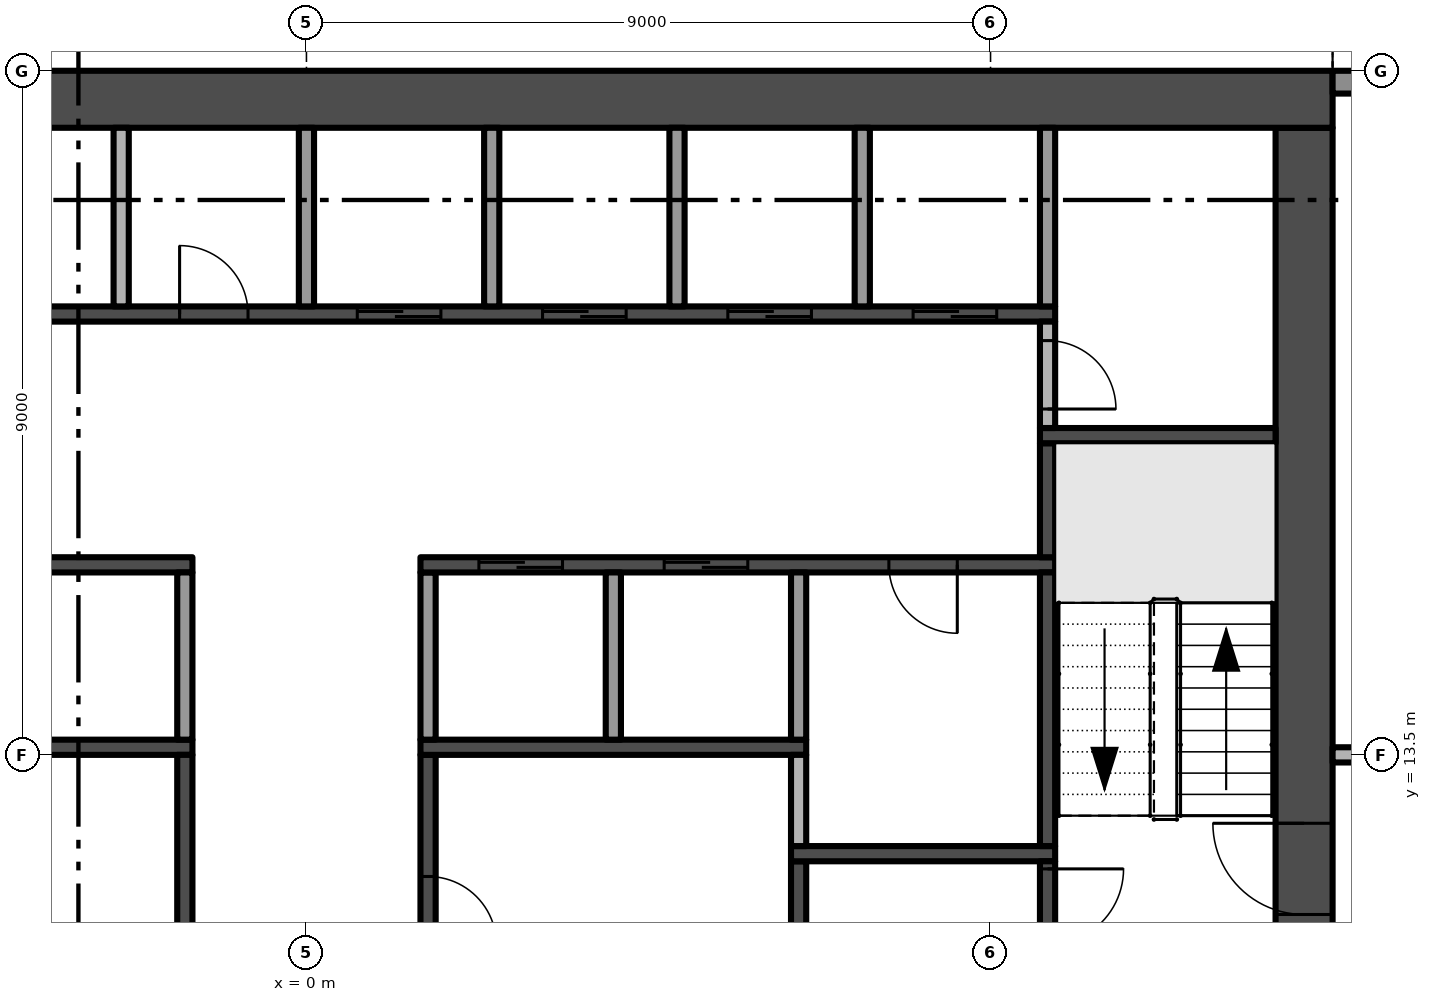
"""IFC4 building model, lengths in metres.
Left out: names, types, materials, properties, quantities, classifications, styles, units other than length and angle.
Written with IfcOpenShell. Run it as: python <this file> out.ifc"""

import sys

from ifc_helpers import new_model, si_unit, direction, frame, frame_2d, origin, place, context, subcontext, project, spatial, rectangle, extrude, element, fill, save


model = new_model("IFC4")
c1 = context("Model", 3, precision=1e-05, world=origin(), true_north=direction((0.0, 1.0)))
c2 = subcontext(c1, "Body", "Model", "MODEL_VIEW")
j1 = project(units=[si_unit("LENGTHUNIT", "METRE"), si_unit("PLANEANGLEUNIT", "RADIAN")], contexts=[c1])
p1 = place(None, origin())
s1 = spatial("IfcSite", under=j1, at=p1, CompositionType="ELEMENT")
p2 = place(p1, origin())
s2 = spatial("IfcBuilding", under=s1, at=p2, CompositionType="ELEMENT")
p3 = place(p2, frame((0.0, 0.0, 132.6)))
s3 = spatial("IfcBuildingStorey", under=s2, at=p3, CompositionType="ELEMENT", Elevation=132.6)
p4 = place(p3, frame((13.125, 5.25, -0.3), z_axis=(0.0, 0.0, 1.0), x_axis=(0.0, 1.0, 0.0)))
e1 = element("IfcWall", 1, at=p4, inside=s3, PredefinedType="SHEAR", context=c2, shape_type="SweptSolid", body=[
    extrude(rectangle(XDim=16.5, YDim=0.75, at=frame_2d((8.25, 0.0))), origin(), (0.0, 0.0, 1.0), 3.8),
])
p5 = place(p4, frame((6.15, 0.0, 0.3)))
e2 = element("IfcOpeningElement", 2, at=p5, cuts=e1, PredefinedType="OPENING", context=c2, shape_type="SweptSolid", body=[
    extrude(rectangle(XDim=1.2, YDim=2.2, at=frame_2d((0.6, 1.1))), frame((0.0, 0.385, 0.0), z_axis=(0.0, -1.0, 0.0), x_axis=(1.0, 0.0, 0.0)), (0.0, 0.0, 1.0), 0.77),
])
p6 = place(p3, frame((13.5, 22.125, -0.3), z_axis=(0.0, 0.0, 1.0), x_axis=(-1.0, 0.0, 0.0)))
e3 = element("IfcWall", 3, at=p6, inside=s3, PredefinedType="SHEAR", context=c2, shape_type="SweptSolid", body=[
    extrude(rectangle(XDim=27.0, YDim=0.75, at=frame_2d((13.5, 0.0))), origin(), (0.0, 0.0, 1.0), 3.8),
])
p7 = place(p3, frame((13.5, 22.35, 0.0), z_axis=(0.0, 0.0, 1.0), x_axis=(1.0, 0.0, 0.0)))
e4 = element("IfcWall", 4, at=p7, inside=s3, PredefinedType="SOLIDWALL", context=c2, shape_type="SweptSolid", body=[
    extrude(rectangle(XDim=3.3, YDim=0.3, at=frame_2d((1.65, 0.0))), origin(), (0.0, 0.0, 1.0), 3.5),
])
p8 = place(p7, frame((2.05, 0.0, 0.45)))
e5 = element("IfcOpeningElement", 5, at=p8, cuts=e4, PredefinedType="OPENING", context=c2, shape_type="SweptSolid", body=[
    extrude(rectangle(XDim=0.95, YDim=2.65, at=frame_2d((0.475, 1.325))), frame((0.0, 0.16, 0.0), z_axis=(0.0, -1.0, 0.0), x_axis=(1.0, 0.0, 0.0)), (0.0, 0.0, 1.0), 0.32),
])
p9 = place(p7, frame((0.7, 0.0, 0.0)))
e6 = element("IfcOpeningElement", 6, at=p9, cuts=e4, PredefinedType="OPENING", context=c2, shape_type="SweptSolid", body=[
    extrude(rectangle(XDim=1.2, YDim=2.4, at=frame_2d((0.6, 1.2))), frame((0.0, 0.16, 0.0), z_axis=(0.0, -1.0, 0.0), x_axis=(1.0, 0.0, 0.0)), (0.0, 0.0, 1.0), 0.32),
])
p10 = place(p3, frame((-1.5, 16.0, 0.0), z_axis=(0.0, 0.0, 1.0), x_axis=(-1.0, 0.0, 0.0)))
e7 = element("IfcWall", 7, at=p10, inside=s3, PredefinedType="SHEAR", context=c2, shape_type="SweptSolid", body=[
    extrude(rectangle(XDim=8.35, YDim=0.2, at=frame_2d((4.175, 0.0))), origin(), (0.0, 0.0, 1.0), 3.5),
])
p11 = place(p10, frame((6.162, 0.0, 0.0)))
e8 = element("IfcOpeningElement", 8, at=p11, cuts=e7, PredefinedType="OPENING", context=c2, shape_type="SweptSolid", body=[
    extrude(rectangle(XDim=0.9, YDim=2.1, at=frame_2d((0.45, 1.05))), frame((0.0, 0.11, 0.0), z_axis=(0.0, -1.0, 0.0), x_axis=(1.0, 0.0, 0.0)), (0.0, 0.0, 1.0), 0.22),
])
p12 = place(p3, frame((-9.85, 19.3, 0.0), z_axis=(0.0, 0.0, 1.0), x_axis=(1.0, 0.0, 0.0)))
e9 = element("IfcWall", 9, at=p12, inside=s3, PredefinedType="SHEAR", context=c2, shape_type="SweptSolid", body=[
    extrude(rectangle(XDim=19.7, YDim=0.2, at=frame_2d((9.85, 0.0))), origin(), (0.0, 0.0, 1.0), 3.5),
])
p13 = place(p12, frame((10.519, 0.0, 0.0)))
e10 = element("IfcOpeningElement", 10, at=p13, cuts=e9, PredefinedType="OPENING", context=c2, shape_type="SweptSolid", body=[
    extrude(rectangle(XDim=1.1, YDim=2.1, at=frame_2d((0.55, 1.05))), frame((0.0, 0.11, 0.0), z_axis=(0.0, -1.0, 0.0), x_axis=(1.0, 0.0, 0.0)), (0.0, 0.0, 1.0), 0.22),
])
p14 = place(p12, frame((12.956, 0.0, 0.0)))
e11 = element("IfcOpeningElement", 11, at=p14, cuts=e9, PredefinedType="OPENING", context=c2, shape_type="SweptSolid", body=[
    extrude(rectangle(XDim=1.1, YDim=2.1, at=frame_2d((0.55, 1.05))), frame((0.0, 0.11, 0.0), z_axis=(0.0, -1.0, 0.0), x_axis=(1.0, 0.0, 0.0)), (0.0, 0.0, 1.0), 0.22),
])
p15 = place(p12, frame((15.394, 0.0, 0.0)))
e12 = element("IfcOpeningElement", 12, at=p15, cuts=e9, PredefinedType="OPENING", context=c2, shape_type="SweptSolid", body=[
    extrude(rectangle(XDim=1.1, YDim=2.1, at=frame_2d((0.55, 1.05))), frame((0.0, 0.11, 0.0), z_axis=(0.0, -1.0, 0.0), x_axis=(1.0, 0.0, 0.0)), (0.0, 0.0, 1.0), 0.22),
])
p16 = place(p12, frame((17.831, 0.0, 0.0)))
e13 = element("IfcOpeningElement", 13, at=p16, cuts=e9, PredefinedType="OPENING", context=c2, shape_type="SweptSolid", body=[
    extrude(rectangle(XDim=1.1, YDim=2.1, at=frame_2d((0.55, 1.05))), frame((0.0, 0.11, 0.0), z_axis=(0.0, -1.0, 0.0), x_axis=(1.0, 0.0, 0.0)), (0.0, 0.0, 1.0), 0.22),
])
p17 = place(p12, frame((3.306, 0.0, 0.0)))
e14 = element("IfcOpeningElement", 14, at=p17, cuts=e9, PredefinedType="OPENING", context=c2, shape_type="SweptSolid", body=[
    extrude(rectangle(XDim=0.9, YDim=2.1, at=frame_2d((0.45, 1.05))), frame((0.0, 0.11, 0.0), z_axis=(0.0, -1.0, 0.0), x_axis=(1.0, 0.0, 0.0)), (0.0, 0.0, 1.0), 0.22),
])
p18 = place(p12, frame((8.181, 0.0, 0.0)))
e15 = element("IfcOpeningElement", 15, at=p18, cuts=e9, PredefinedType="OPENING", context=c2, shape_type="SweptSolid", body=[
    extrude(rectangle(XDim=0.9, YDim=2.1, at=frame_2d((0.45, 1.05))), frame((0.0, 0.11, 0.0), z_axis=(0.0, -1.0, 0.0), x_axis=(1.0, 0.0, 0.0)), (0.0, 0.0, 1.0), 0.22),
])
p19 = place(p3, frame((-6.575, 13.6, 0.0), z_axis=(0.0, 0.0, 1.0), x_axis=(1.0, 0.0, 0.0)))
e16 = element("IfcWall", 16, at=p19, inside=s3, PredefinedType="SHEAR", context=c2, shape_type="SweptSolid", body=[
    extrude(rectangle(XDim=5.075, YDim=0.2, at=frame_2d((2.538, 0.0))), origin(), (0.0, 0.0, 1.0), 3.5),
])
p20 = place(p3, frame((-2.438, 19.4, 0.0), z_axis=(0.0, 0.0, 1.0), x_axis=(0.0, 1.0, 0.0)))
e17 = element("IfcWall", 17, at=p20, inside=s3, PredefinedType="PARTITIONING", context=c2, shape_type="SweptSolid", body=[
    extrude(rectangle(XDim=2.35, YDim=0.2, at=frame_2d((1.175, 0.0))), origin(), (0.0, 0.0, 1.0), 3.5),
])
p21 = place(p3, frame((-1.6, 8.15, 0.0), z_axis=(0.0, 0.0, 1.0), x_axis=(0.0, 1.0, 0.0)))
e18 = element("IfcWall", 18, at=p21, inside=s3, PredefinedType="SHEAR", context=c2, shape_type="SweptSolid", body=[
    extrude(rectangle(XDim=5.35, YDim=0.2, at=frame_2d((2.675, 0.0))), origin(), (0.0, 0.0, 1.0), 3.5),
])
p22 = place(p21, frame((2.225, 0.0, 0.0)))
e19 = element("IfcOpeningElement", 19, at=p22, cuts=e18, PredefinedType="OPENING", context=c2, shape_type="SweptSolid", body=[
    extrude(rectangle(XDim=0.9, YDim=2.1, at=frame_2d((0.45, 1.05))), frame((0.0, 0.11, 0.0), z_axis=(0.0, -1.0, 0.0), x_axis=(1.0, 0.0, 0.0)), (0.0, 0.0, 1.0), 0.22),
])
p23 = place(p3, frame((-1.6, 13.7, 0.0), z_axis=(0.0, 0.0, 1.0), x_axis=(0.0, 1.0, 0.0)))
e20 = element("IfcWall", 20, at=p23, inside=s3, PredefinedType="PARTITIONING", context=c2, shape_type="SweptSolid", body=[
    extrude(rectangle(XDim=2.2, YDim=0.2, at=frame_2d((1.1, 0.0))), origin(), (0.0, 0.0, 1.0), 3.5),
])
p24 = place(p3, frame((0.0, 19.4, 0.0), z_axis=(0.0, 0.0, 1.0), x_axis=(0.0, 1.0, 0.0)))
e21 = element("IfcWall", 21, at=p24, inside=s3, PredefinedType="PARTITIONING", context=c2, shape_type="SweptSolid", body=[
    extrude(rectangle(XDim=2.35, YDim=0.2, at=frame_2d((1.175, 0.0))), origin(), (0.0, 0.0, 1.0), 3.5),
])
p25 = place(p3, frame((1.6, 13.5, 0.0), z_axis=(0.0, 0.0, 1.0), x_axis=(0.0, -1.0, 0.0)))
e22 = element("IfcWall", 22, at=p25, inside=s3, PredefinedType="SHEAR", context=c2, shape_type="SweptSolid", body=[
    extrude(rectangle(XDim=4.1, YDim=0.2, at=frame_2d((2.05, 0.0))), origin(), (0.0, 0.0, 1.0), 3.5),
])
p26 = place(p25, frame((1.6, 0.0, 0.0)))
e23 = element("IfcOpeningElement", 23, at=p26, cuts=e22, PredefinedType="OPENING", context=c2, shape_type="SweptSolid", body=[
    extrude(rectangle(XDim=0.9, YDim=2.1, at=frame_2d((0.45, 1.05))), frame((0.0, 0.11, 0.0), z_axis=(0.0, -1.0, 0.0), x_axis=(1.0, 0.0, 0.0)), (0.0, 0.0, 1.0), 0.22),
])
p27 = place(p3, frame((1.5, 13.6, 0.0), z_axis=(0.0, 0.0, 1.0), x_axis=(1.0, 0.0, 0.0)))
e24 = element("IfcWall", 24, at=p27, inside=s3, PredefinedType="SHEAR", context=c2, shape_type="SweptSolid", body=[
    extrude(rectangle(XDim=5.075, YDim=0.2, at=frame_2d((2.538, 0.0))), origin(), (0.0, 0.0, 1.0), 3.5),
])
p28 = place(p3, frame((1.6, 13.7, 0.0), z_axis=(0.0, 0.0, 1.0), x_axis=(0.0, 1.0, 0.0)))
e25 = element("IfcWall", 25, at=p28, inside=s3, PredefinedType="PARTITIONING", context=c2, shape_type="SweptSolid", body=[
    extrude(rectangle(XDim=2.2, YDim=0.2, at=frame_2d((1.1, 0.0))), origin(), (0.0, 0.0, 1.0), 3.5),
])
p29 = place(p3, frame((9.85, 16.0, 0.0), z_axis=(0.0, 0.0, 1.0), x_axis=(-1.0, 0.0, 0.0)))
e26 = element("IfcWall", 26, at=p29, inside=s3, PredefinedType="SHEAR", context=c2, shape_type="SweptSolid", body=[
    extrude(rectangle(XDim=8.35, YDim=0.2, at=frame_2d((4.175, 0.0))), origin(), (0.0, 0.0, 1.0), 3.5),
])
p30 = place(p29, frame((6.481, 0.0, 0.0)))
e27 = element("IfcOpeningElement", 27, at=p30, cuts=e26, PredefinedType="OPENING", context=c2, shape_type="SweptSolid", body=[
    extrude(rectangle(XDim=1.1, YDim=2.1, at=frame_2d((0.55, 1.05))), frame((0.0, 0.11, 0.0), z_axis=(0.0, -1.0, 0.0), x_axis=(1.0, 0.0, 0.0)), (0.0, 0.0, 1.0), 0.22),
])
p31 = place(p29, frame((4.044, 0.0, 0.0)))
e28 = element("IfcOpeningElement", 28, at=p31, cuts=e26, PredefinedType="OPENING", context=c2, shape_type="SweptSolid", body=[
    extrude(rectangle(XDim=1.1, YDim=2.1, at=frame_2d((0.55, 1.05))), frame((0.0, 0.11, 0.0), z_axis=(0.0, -1.0, 0.0), x_axis=(1.0, 0.0, 0.0)), (0.0, 0.0, 1.0), 0.22),
])
p32 = place(p29, frame((1.288, 0.0, 0.0)))
e29 = element("IfcOpeningElement", 29, at=p32, cuts=e26, PredefinedType="OPENING", context=c2, shape_type="SweptSolid", body=[
    extrude(rectangle(XDim=0.9, YDim=2.1, at=frame_2d((0.45, 1.05))), frame((0.0, 0.11, 0.0), z_axis=(0.0, -1.0, 0.0), x_axis=(1.0, 0.0, 0.0)), (0.0, 0.0, 1.0), 0.22),
])
p33 = place(p3, frame((2.438, 19.4, 0.0), z_axis=(0.0, 0.0, 1.0), x_axis=(0.0, 1.0, 0.0)))
e30 = element("IfcWall", 30, at=p33, inside=s3, PredefinedType="PARTITIONING", context=c2, shape_type="SweptSolid", body=[
    extrude(rectangle(XDim=2.35, YDim=0.2, at=frame_2d((1.175, 0.0))), origin(), (0.0, 0.0, 1.0), 3.5),
])
p34 = place(p3, frame((4.037, 13.7, 0.0), z_axis=(0.0, 0.0, 1.0), x_axis=(0.0, 1.0, 0.0)))
e31 = element("IfcWall", 31, at=p34, inside=s3, PredefinedType="PARTITIONING", context=c2, shape_type="SweptSolid", body=[
    extrude(rectangle(XDim=2.2, YDim=0.2, at=frame_2d((1.1, 0.0))), origin(), (0.0, 0.0, 1.0), 3.5),
])
p35 = place(p3, frame((4.875, 19.4, 0.0), z_axis=(0.0, 0.0, 1.0), x_axis=(0.0, 1.0, 0.0)))
e32 = element("IfcWall", 32, at=p35, inside=s3, PredefinedType="PARTITIONING", context=c2, shape_type="SweptSolid", body=[
    extrude(rectangle(XDim=2.35, YDim=0.2, at=frame_2d((1.175, 0.0))), origin(), (0.0, 0.0, 1.0), 3.5),
])
p36 = place(p3, frame((6.475, 9.4, 0.0), z_axis=(0.0, 0.0, 1.0), x_axis=(0.0, 1.0, 0.0)))
e33 = element("IfcWall", 33, at=p36, inside=s3, PredefinedType="SHEAR", context=c2, shape_type="SweptSolid", body=[
    extrude(rectangle(XDim=2.7, YDim=0.2, at=frame_2d((1.35, 0.0))), origin(), (0.0, 0.0, 1.0), 3.5),
])
p37 = place(p3, frame((6.375, 12.2, 0.0), z_axis=(0.0, 0.0, 1.0), x_axis=(1.0, 0.0, 0.0)))
e34 = element("IfcWall", 34, at=p37, inside=s3, PredefinedType="SHEAR", context=c2, shape_type="SweptSolid", body=[
    extrude(rectangle(XDim=3.475, YDim=0.2, at=frame_2d((1.738, 0.0))), origin(), (0.0, 0.0, 1.0), 3.5),
])
p38 = place(p3, frame((6.475, 12.3, 0.0), z_axis=(0.0, 0.0, 1.0), x_axis=(0.0, 1.0, 0.0)))
e35 = element("IfcWall", 35, at=p38, inside=s3, PredefinedType="PARTITIONING", context=c2, shape_type="SweptSolid", body=[
    extrude(rectangle(XDim=1.2, YDim=0.2, at=frame_2d((0.6, 0.0))), origin(), (0.0, 0.0, 1.0), 3.5),
])
p39 = place(p3, frame((6.475, 13.7, 0.0), z_axis=(0.0, 0.0, 1.0), x_axis=(0.0, 1.0, 0.0)))
e36 = element("IfcWall", 36, at=p39, inside=s3, PredefinedType="PARTITIONING", context=c2, shape_type="SweptSolid", body=[
    extrude(rectangle(XDim=2.2, YDim=0.2, at=frame_2d((1.1, 0.0))), origin(), (0.0, 0.0, 1.0), 3.5),
])
p40 = place(p3, frame((7.312, 19.4, 0.0), z_axis=(0.0, 0.0, 1.0), x_axis=(0.0, 1.0, 0.0)))
e37 = element("IfcWall", 37, at=p40, inside=s3, PredefinedType="PARTITIONING", context=c2, shape_type="SweptSolid", body=[
    extrude(rectangle(XDim=2.35, YDim=0.2, at=frame_2d((1.175, 0.0))), origin(), (0.0, 0.0, 1.0), 3.5),
])
p41 = place(p3, frame((9.75, 12.1, 0.0), z_axis=(0.0, 0.0, 1.0), x_axis=(0.0, -1.0, 0.0)))
e38 = element("IfcWall", 38, at=p41, inside=s3, PredefinedType="SHEAR", context=c2, shape_type="SweptSolid", body=[
    extrude(rectangle(XDim=1.9, YDim=0.2, at=frame_2d((0.95, 0.0))), origin(), (0.0, 0.0, 1.0), 3.5),
])
p42 = place(p41, frame((0.1, 0.0, 0.0)))
e39 = element("IfcOpeningElement", 39, at=p42, cuts=e38, PredefinedType="OPENING", context=c2, shape_type="SweptSolid", body=[
    extrude(rectangle(XDim=1.0, YDim=2.2, at=frame_2d((0.5, 1.1))), frame((0.0, 0.11, 0.0), z_axis=(0.0, -1.0, 0.0), x_axis=(1.0, 0.0, 0.0)), (0.0, 0.0, 1.0), 0.22),
])
p43 = place(p3, frame((9.75, 12.3, 0.0), z_axis=(0.0, 0.0, 1.0), x_axis=(0.0, 1.0, 0.0)))
e40 = element("IfcWall", 40, at=p43, inside=s3, PredefinedType="SHEAR", context=c2, shape_type="SweptSolid", body=[
    extrude(rectangle(XDim=3.6, YDim=0.2, at=frame_2d((1.8, 0.0))), origin(), (0.0, 0.0, 1.0), 3.5),
])
p44 = place(p3, frame((9.75, 16.1, 0.0), z_axis=(0.0, 0.0, 1.0), x_axis=(0.0, 1.0, 0.0)))
e41 = element("IfcWall", 41, at=p44, inside=s3, PredefinedType="SHEAR", context=c2, shape_type="SweptSolid", body=[
    extrude(rectangle(XDim=1.5, YDim=0.2, at=frame_2d((0.75, 0.0))), origin(), (0.0, 0.0, 1.0), 3.5),
])
p45 = place(p3, frame((9.65, 17.7, 0.0), z_axis=(0.0, 0.0, 1.0), x_axis=(1.0, 0.0, 0.0)))
e42 = element("IfcWall", 42, at=p45, inside=s3, PredefinedType="SHEAR", context=c2, shape_type="SweptSolid", body=[
    extrude(rectangle(XDim=3.1, YDim=0.2, at=frame_2d((1.55, 0.0))), origin(), (0.0, 0.0, 1.0), 3.5),
])
p46 = place(p3, frame((9.75, 19.2, 0.0), z_axis=(0.0, 0.0, 1.0), x_axis=(0.0, -1.0, 0.0)))
e43 = element("IfcWall", 43, at=p46, inside=s3, PredefinedType="PARTITIONING", context=c2, shape_type="SweptSolid", body=[
    extrude(rectangle(XDim=1.4, YDim=0.2, at=frame_2d((0.7, 0.0))), origin(), (0.0, 0.0, 1.0), 3.5),
])
p47 = place(p46, frame((0.25, 0.0, 0.0)))
e44 = element("IfcOpeningElement", 44, at=p47, cuts=e43, PredefinedType="OPENING", context=c2, shape_type="SweptSolid", body=[
    extrude(rectangle(XDim=0.9, YDim=2.1, at=frame_2d((0.45, 1.05))), frame((0.0, 0.11, 0.0), z_axis=(0.0, -1.0, 0.0), x_axis=(1.0, 0.0, 0.0)), (0.0, 0.0, 1.0), 0.22),
])
p48 = place(p3, frame((9.75, 19.4, 0.0), z_axis=(0.0, 0.0, 1.0), x_axis=(0.0, 1.0, 0.0)))
e45 = element("IfcWall", 45, at=p48, inside=s3, PredefinedType="PARTITIONING", context=c2, shape_type="SweptSolid", body=[
    extrude(rectangle(XDim=2.35, YDim=0.2, at=frame_2d((1.175, 0.0))), origin(), (0.0, 0.0, 1.0), 3.5),
])
p49 = place(p3, frame((13.5, 13.5, 0.0), z_axis=(0.0, 0.0, 1.0), x_axis=(1.0, 0.0, 0.0)))
e46 = element("IfcWall", 46, at=p49, inside=s3, PredefinedType="PARTITIONING", context=c2, shape_type="SweptSolid", body=[
    extrude(rectangle(XDim=3.85, YDim=0.2, at=frame_2d((1.925, 0.0))), origin(), (0.0, 0.0, 1.0), 3.5),
])
p50 = place(p49, frame((1.6, 0.0, 0.0)))
e47 = element("IfcOpeningElement", 47, at=p50, cuts=e46, PredefinedType="OPENING", context=c2, shape_type="SweptSolid", body=[
    extrude(rectangle(XDim=0.9, YDim=2.1, at=frame_2d((0.45, 1.05))), frame((0.0, 0.11, 0.0), z_axis=(0.0, -1.0, 0.0), x_axis=(1.0, 0.0, 0.0)), (0.0, 0.0, 1.0), 0.22),
])
p51 = place(p5, frame((1.2, 0.0, 0.0), z_axis=(0.0, 0.0, 1.0), x_axis=(-1.0, 0.0, 0.0)))
e48 = element("IfcDoor", 48, at=p51, inside=s3, OperationType="SINGLE_SWING_LEFT", PredefinedType="DOOR", context=c2, shape_type="SweptSolid", body=[
    extrude(rectangle(XDim=1.2, YDim=2.2, at=frame_2d((0.6, 1.1))), frame((0.0, 0.025, 0.0), z_axis=(0.0, -1.0, 0.0), x_axis=(1.0, 0.0, 0.0)), (0.0, 0.0, 1.0), 0.05),
])
fill(e2, e48)
p52 = place(p42, origin())
e49 = element("IfcDoor", 49, at=p52, inside=s3, OperationType="SINGLE_SWING_LEFT", PredefinedType="DOOR", context=c2, shape_type="SweptSolid", body=[
    extrude(rectangle(XDim=1.0, YDim=2.2, at=frame_2d((0.5, 1.1))), frame((0.0, 0.025, 0.0), z_axis=(0.0, -1.0, 0.0), x_axis=(1.0, 0.0, 0.0)), (0.0, 0.0, 1.0), 0.05),
])
fill(e39, e49)
p53 = place(p13, origin())
e50 = element("IfcDoor", 50, at=p53, inside=s3, OperationType="SLIDING_TO_RIGHT", PredefinedType="DOOR", context=c2, shape_type="SweptSolid", body=[
    extrude(rectangle(XDim=1.1, YDim=2.1, at=frame_2d((0.55, 1.05))), frame((0.0, 0.025, 0.0), z_axis=(0.0, -1.0, 0.0), x_axis=(1.0, 0.0, 0.0)), (0.0, 0.0, 1.0), 0.05),
])
fill(e10, e50)
p54 = place(p14, origin())
e51 = element("IfcDoor", 51, at=p54, inside=s3, OperationType="SLIDING_TO_RIGHT", PredefinedType="DOOR", context=c2, shape_type="SweptSolid", body=[
    extrude(rectangle(XDim=1.1, YDim=2.1, at=frame_2d((0.55, 1.05))), frame((0.0, 0.025, 0.0), z_axis=(0.0, -1.0, 0.0), x_axis=(1.0, 0.0, 0.0)), (0.0, 0.0, 1.0), 0.05),
])
fill(e11, e51)
p55 = place(p15, origin())
e52 = element("IfcDoor", 52, at=p55, inside=s3, OperationType="SLIDING_TO_RIGHT", PredefinedType="DOOR", context=c2, shape_type="SweptSolid", body=[
    extrude(rectangle(XDim=1.1, YDim=2.1, at=frame_2d((0.55, 1.05))), frame((0.0, 0.025, 0.0), z_axis=(0.0, -1.0, 0.0), x_axis=(1.0, 0.0, 0.0)), (0.0, 0.0, 1.0), 0.05),
])
fill(e12, e52)
p56 = place(p16, origin())
e53 = element("IfcDoor", 53, at=p56, inside=s3, OperationType="SLIDING_TO_RIGHT", PredefinedType="DOOR", context=c2, shape_type="SweptSolid", body=[
    extrude(rectangle(XDim=1.1, YDim=2.1, at=frame_2d((0.55, 1.05))), frame((0.0, 0.025, 0.0), z_axis=(0.0, -1.0, 0.0), x_axis=(1.0, 0.0, 0.0)), (0.0, 0.0, 1.0), 0.05),
])
fill(e13, e53)
p57 = place(p30, origin())
e54 = element("IfcDoor", 54, at=p57, inside=s3, OperationType="SLIDING_TO_RIGHT", PredefinedType="DOOR", context=c2, shape_type="SweptSolid", body=[
    extrude(rectangle(XDim=1.1, YDim=2.1, at=frame_2d((0.55, 1.05))), frame((0.0, 0.025, 0.0), z_axis=(0.0, -1.0, 0.0), x_axis=(1.0, 0.0, 0.0)), (0.0, 0.0, 1.0), 0.05),
])
fill(e27, e54)
p58 = place(p31, origin())
e55 = element("IfcDoor", 55, at=p58, inside=s3, OperationType="SLIDING_TO_RIGHT", PredefinedType="DOOR", context=c2, shape_type="SweptSolid", body=[
    extrude(rectangle(XDim=1.1, YDim=2.1, at=frame_2d((0.55, 1.05))), frame((0.0, 0.025, 0.0), z_axis=(0.0, -1.0, 0.0), x_axis=(1.0, 0.0, 0.0)), (0.0, 0.0, 1.0), 0.05),
])
fill(e28, e55)
p59 = place(p26, origin())
e56 = element("IfcDoor", 56, at=p59, inside=s3, OperationType="SINGLE_SWING_RIGHT", PredefinedType="DOOR", context=c2, shape_type="SweptSolid", body=[
    extrude(rectangle(XDim=0.9, YDim=2.1, at=frame_2d((0.45, 1.05))), frame((0.0, 0.025, 0.0), z_axis=(0.0, -1.0, 0.0), x_axis=(1.0, 0.0, 0.0)), (0.0, 0.0, 1.0), 0.05),
])
fill(e23, e56)
p60 = place(p32, origin())
e57 = element("IfcDoor", 57, at=p60, inside=s3, OperationType="SINGLE_SWING_LEFT", PredefinedType="DOOR", context=c2, shape_type="SweptSolid", body=[
    extrude(rectangle(XDim=0.9, YDim=2.1, at=frame_2d((0.45, 1.05))), frame((0.0, 0.025, 0.0), z_axis=(0.0, -1.0, 0.0), x_axis=(1.0, 0.0, 0.0)), (0.0, 0.0, 1.0), 0.05),
])
fill(e29, e57)
p61 = place(p47, origin())
e58 = element("IfcDoor", 58, at=p61, inside=s3, OperationType="SINGLE_SWING_RIGHT", PredefinedType="DOOR", context=c2, shape_type="SweptSolid", body=[
    extrude(rectangle(XDim=0.9, YDim=2.1, at=frame_2d((0.45, 1.05))), frame((0.0, 0.025, 0.0), z_axis=(0.0, -1.0, 0.0), x_axis=(1.0, 0.0, 0.0)), (0.0, 0.0, 1.0), 0.05),
])
fill(e44, e58)
p62 = place(p18, origin())
e59 = element("IfcDoor", 59, at=p62, inside=s3, OperationType="SINGLE_SWING_LEFT", PredefinedType="DOOR", context=c2, shape_type="SweptSolid", body=[
    extrude(rectangle(XDim=0.9, YDim=2.1, at=frame_2d((0.45, 1.05))), frame((0.0, 0.025, 0.0), z_axis=(0.0, -1.0, 0.0), x_axis=(1.0, 0.0, 0.0)), (0.0, 0.0, 1.0), 0.05),
])
fill(e15, e59)
save(model, sys.argv[1])
